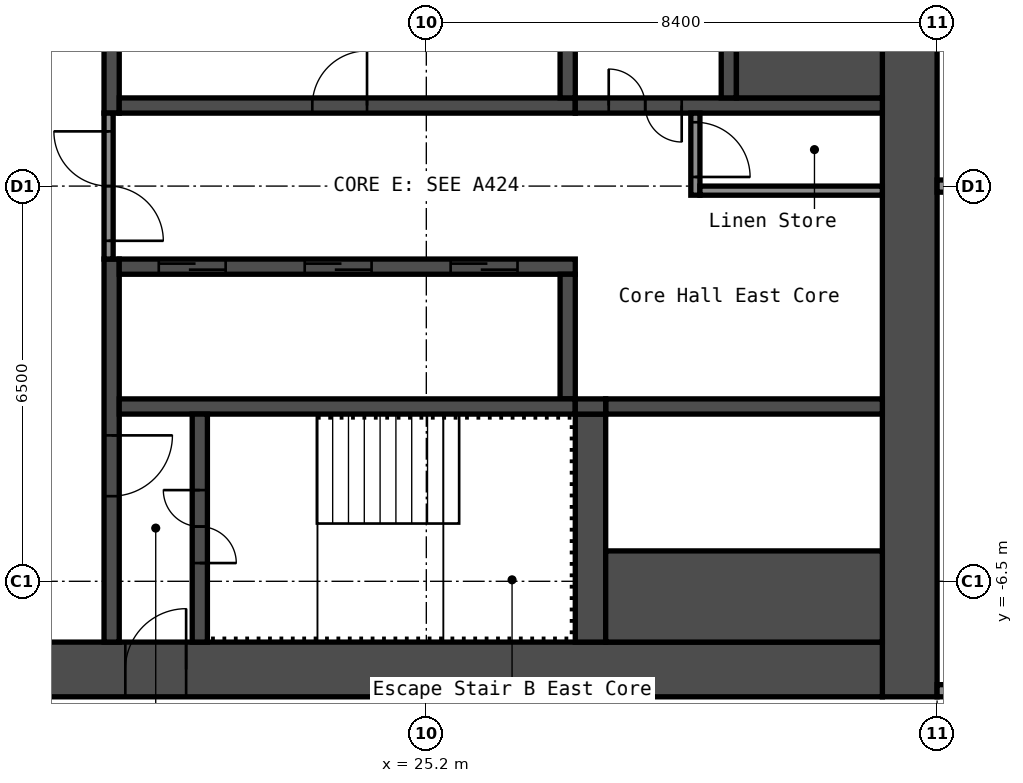
"""IFC4 building model, lengths in metres.
Left out: names, types, materials, properties, quantities, classifications, styles, units other than length and angle.
Written with IfcOpenShell. Run it as: python <this file> out.ifc"""

import sys

from ifc_helpers import new_model, si_unit, direction, frame, frame_2d, origin, place, context, subcontext, project, spatial, rectangle, extrude, element, fill, save


model = new_model("IFC4")
c1 = context("Model", 3, precision=1e-05, world=origin(), true_north=direction((0.0, 1.0)))
c2 = subcontext(c1, "Body", "Model", "MODEL_VIEW")
j1 = project(units=[si_unit("LENGTHUNIT", "METRE"), si_unit("PLANEANGLEUNIT", "RADIAN")], contexts=[c1])
p1 = place(None, origin())
s1 = spatial("IfcSite", under=j1, at=p1, CompositionType="ELEMENT")
p2 = place(p1, origin())
s2 = spatial("IfcBuilding", under=s1, at=p2, CompositionType="ELEMENT")
p3 = place(p2, frame((0.0, 0.0, 163.0)))
s3 = spatial("IfcBuildingStorey", under=s2, at=p3, CompositionType="ELEMENT", Elevation=163.0)
p4 = place(p3, frame((33.15, -8.4, 0.0), z_axis=(0.0, 0.0, 1.0), x_axis=(0.0, 1.0, 0.0)))
e1 = element("IfcWall", 1, at=p4, inside=s3, PredefinedType="SHEAR", context=c2, shape_type="SweptSolid", body=[
    extrude(rectangle(XDim=16.8, YDim=0.9, at=frame_2d((8.4, 0.0))), origin(), (0.0, 0.0, 1.0), 2.75),
])
p5 = place(p3, frame((17.7, -7.95, 0.0), z_axis=(0.0, 0.0, 1.0), x_axis=(1.0, 0.0, 0.0)))
e2 = element("IfcWall", 2, at=p5, inside=s3, PredefinedType="SHEAR", context=c2, shape_type="SweptSolid", body=[
    extrude(rectangle(XDim=15.0, YDim=0.9, at=frame_2d((7.5, 0.0))), origin(), (0.0, 0.0, 1.0), 2.75),
])
p6 = place(p5, frame((2.55, 0.0, 0.0)))
e3 = element("IfcOpeningElement", 3, at=p6, cuts=e2, PredefinedType="OPENING", context=c2, shape_type="SweptSolid", body=[
    extrude(rectangle(XDim=1.0, YDim=2.1, at=frame_2d((0.5, 1.05))), frame((0.0, 0.46, 0.0), z_axis=(0.0, -1.0, 0.0), x_axis=(1.0, 0.0, 0.0)), (0.0, 0.0, 1.0), 0.92),
])
p7 = place(p3, frame((20.025, 1.2, 0.0), z_axis=(0.0, 0.0, 1.0), x_axis=(0.0, 1.0, 0.0)))
e4 = element("IfcWall", 4, at=p7, inside=s3, PredefinedType="SHEAR", context=c2, shape_type="SweptSolid", body=[
    extrude(rectangle(XDim=6.3, YDim=0.25, at=frame_2d((3.15, 0.0))), origin(), (0.0, 0.0, 1.0), 2.75),
])
p8 = place(p3, frame((20.025, -7.5, 0.0), z_axis=(0.0, 0.0, 1.0), x_axis=(0.0, 1.0, 0.0)))
e5 = element("IfcWall", 5, at=p8, inside=s3, PredefinedType="SHEAR", context=c2, shape_type="SweptSolid", body=[
    extrude(rectangle(XDim=6.3, YDim=0.25, at=frame_2d((3.15, 0.0))), origin(), (0.0, 0.0, 1.0), 2.75),
])
p9 = place(p8, frame((2.4, 0.0, 0.0)))
e6 = element("IfcOpeningElement", 6, at=p9, cuts=e5, PredefinedType="OPENING", context=c2, shape_type="SweptSolid", body=[
    extrude(rectangle(XDim=1.0, YDim=2.1, at=frame_2d((0.5, 1.05))), frame((0.0, 0.135, 0.0), z_axis=(0.0, -1.0, 0.0), x_axis=(1.0, 0.0, 0.0)), (0.0, 0.0, 1.0), 0.27),
])
p10 = place(p3, frame((20.15, 1.325, 0.0), z_axis=(0.0, 0.0, 1.0), x_axis=(1.0, 0.0, 0.0)))
e7 = element("IfcWall", 7, at=p10, inside=s3, PredefinedType="SHEAR", context=c2, shape_type="SweptSolid", body=[
    extrude(rectangle(XDim=7.5, YDim=0.25, at=frame_2d((3.75, 0.0))), origin(), (0.0, 0.0, 1.0), 2.75),
])
p11 = place(p10, frame((3.175, 0.0, 0.0)))
e8 = element("IfcOpeningElement", 8, at=p11, cuts=e7, PredefinedType="OPENING", context=c2, shape_type="SweptSolid", body=[
    extrude(rectangle(XDim=0.9, YDim=2.1, at=frame_2d((0.45, 1.05))), frame((0.0, 0.135, 0.0), z_axis=(0.0, -1.0, 0.0), x_axis=(1.0, 0.0, 0.0)), (0.0, 0.0, 1.0), 0.27),
])
p12 = place(p3, frame((27.525, 1.45, 0.0), z_axis=(0.0, 0.0, 1.0), x_axis=(0.0, 1.0, 0.0)))
e9 = element("IfcWall", 9, at=p12, inside=s3, PredefinedType="SHEAR", context=c2, shape_type="SweptSolid", body=[
    extrude(rectangle(XDim=2.05, YDim=0.25, at=frame_2d((1.025, 0.0))), origin(), (0.0, 0.0, 1.0), 2.75),
])
p13 = place(p3, frame((27.65, 1.325, 0.0), z_axis=(0.0, 0.0, 1.0), x_axis=(1.0, 0.0, 0.0)))
e10 = element("IfcWall", 10, at=p13, inside=s3, PredefinedType="SHEAR", context=c2, shape_type="SweptSolid", body=[
    extrude(rectangle(XDim=5.05, YDim=0.25, at=frame_2d((2.525, 0.0))), origin(), (0.0, 0.0, 1.0), 2.75),
])
p14 = place(p13, frame((0.55, 0.0, 0.0)))
e11 = element("IfcOpeningElement", 11, at=p14, cuts=e10, PredefinedType="OPENING", context=c2, shape_type="SweptSolid", body=[
    extrude(rectangle(XDim=1.2, YDim=2.1, at=frame_2d((0.6, 1.05))), frame((0.0, 0.135, 0.0), z_axis=(0.0, -1.0, 0.0), x_axis=(1.0, 0.0, 0.0)), (0.0, 0.0, 1.0), 0.27),
])
p15 = place(p3, frame((30.175, 1.45, 0.0), z_axis=(0.0, 0.0, 1.0), x_axis=(0.0, 1.0, 0.0)))
e12 = element("IfcWall", 12, at=p15, inside=s3, PredefinedType="SHEAR", context=c2, shape_type="SweptSolid", body=[
    extrude(rectangle(XDim=6.05, YDim=0.25, at=frame_2d((3.025, 0.0))), origin(), (0.0, 0.0, 1.0), 2.75),
])
p16 = place(p15, frame((2.625, 0.0, 0.0)))
e13 = element("IfcOpeningElement", 13, at=p16, cuts=e12, PredefinedType="OPENING", context=c2, shape_type="SweptSolid", body=[
    extrude(rectangle(XDim=1.1, YDim=2.1, at=frame_2d((0.55, 1.05))), frame((0.0, 0.135, 0.0), z_axis=(0.0, -1.0, 0.0), x_axis=(1.0, 0.0, 0.0)), (0.0, 0.0, 1.0), 0.27),
])
p17 = place(p3, frame((30.3, 2.375, 0.0), z_axis=(0.0, 0.0, 1.0), x_axis=(1.0, 0.0, 0.0)))
e14 = element("IfcWall", 14, at=p17, inside=s3, PredefinedType="SHEAR", context=c2, shape_type="SweptSolid", body=[
    extrude(rectangle(XDim=2.4, YDim=1.85, at=frame_2d((1.2, 0.0))), origin(), (0.0, 0.0, 1.0), 2.75),
])
p18 = place(p3, frame((20.15, -1.325, 0.0), z_axis=(0.0, 0.0, 1.0), x_axis=(1.0, 0.0, 0.0)))
e15 = element("IfcWall", 15, at=p18, inside=s3, PredefinedType="SHEAR", context=c2, shape_type="SweptSolid", body=[
    extrude(rectangle(XDim=7.5, YDim=0.25, at=frame_2d((3.75, 0.0))), origin(), (0.0, 0.0, 1.0), 2.75),
])
p19 = place(p18, frame((0.65, 0.0, 0.0)))
e16 = element("IfcOpeningElement", 16, at=p19, cuts=e15, PredefinedType="OPENING", context=c2, shape_type="SweptSolid", body=[
    extrude(rectangle(XDim=1.1, YDim=2.1, at=frame_2d((0.55, 1.05))), frame((0.0, 0.135, 0.0), z_axis=(0.0, -1.0, 0.0), x_axis=(1.0, 0.0, 0.0)), (0.0, 0.0, 1.0), 0.27),
])
p20 = place(p18, frame((3.05, 0.0, 0.0)))
e17 = element("IfcOpeningElement", 17, at=p20, cuts=e15, PredefinedType="OPENING", context=c2, shape_type="SweptSolid", body=[
    extrude(rectangle(XDim=1.1, YDim=2.1, at=frame_2d((0.55, 1.05))), frame((0.0, 0.135, 0.0), z_axis=(0.0, -1.0, 0.0), x_axis=(1.0, 0.0, 0.0)), (0.0, 0.0, 1.0), 0.27),
])
p21 = place(p18, frame((5.45, 0.0, 0.0)))
e18 = element("IfcOpeningElement", 18, at=p21, cuts=e15, PredefinedType="OPENING", context=c2, shape_type="SweptSolid", body=[
    extrude(rectangle(XDim=1.1, YDim=2.1, at=frame_2d((0.55, 1.05))), frame((0.0, 0.135, 0.0), z_axis=(0.0, -1.0, 0.0), x_axis=(1.0, 0.0, 0.0)), (0.0, 0.0, 1.0), 0.27),
])
p22 = place(p3, frame((27.525, -3.5, 0.0), z_axis=(0.0, 0.0, 1.0), x_axis=(0.0, 1.0, 0.0)))
e19 = element("IfcWall", 19, at=p22, inside=s3, PredefinedType="SHEAR", context=c2, shape_type="SweptSolid", body=[
    extrude(rectangle(XDim=2.05, YDim=0.25, at=frame_2d((1.025, 0.0))), origin(), (0.0, 0.0, 1.0), 2.75),
])
p23 = place(p3, frame((20.15, -3.625, 0.0), z_axis=(0.0, 0.0, 1.0), x_axis=(1.0, 0.0, 0.0)))
e20 = element("IfcWall", 20, at=p23, inside=s3, PredefinedType="SHEAR", context=c2, shape_type="SweptSolid", body=[
    extrude(rectangle(XDim=7.5, YDim=0.25, at=frame_2d((3.75, 0.0))), origin(), (0.0, 0.0, 1.0), 2.75),
])
p24 = place(p3, frame((21.475, -7.5, 0.0), z_axis=(0.0, 0.0, 1.0), x_axis=(0.0, 1.0, 0.0)))
e21 = element("IfcWall", 21, at=p24, inside=s3, PredefinedType="SHEAR", context=c2, shape_type="SweptSolid", body=[
    extrude(rectangle(XDim=3.75, YDim=0.25, at=frame_2d((1.875, 0.0))), origin(), (0.0, 0.0, 1.0), 2.75),
])
p25 = place(p24, frame((1.3, 0.0, 0.0)))
e22 = element("IfcOpeningElement", 22, at=p25, cuts=e21, PredefinedType="OPENING", context=c2, shape_type="SweptSolid", body=[
    extrude(rectangle(XDim=1.2, YDim=2.1, at=frame_2d((0.6, 1.05))), frame((0.0, 0.135, 0.0), z_axis=(0.0, -1.0, 0.0), x_axis=(1.0, 0.0, 0.0)), (0.0, 0.0, 1.0), 0.27),
])
p26 = place(p3, frame((27.9, -7.5, 0.0), z_axis=(0.0, 0.0, 1.0), x_axis=(0.0, 1.0, 0.0)))
e23 = element("IfcWall", 23, at=p26, inside=s3, PredefinedType="SHEAR", context=c2, shape_type="SweptSolid", body=[
    extrude(rectangle(XDim=3.75, YDim=0.5, at=frame_2d((1.875, 0.0))), origin(), (0.0, 0.0, 1.0), 2.75),
])
p27 = place(p3, frame((28.15, -3.625, 0.0), z_axis=(0.0, 0.0, 1.0), x_axis=(1.0, 0.0, 0.0)))
e24 = element("IfcWall", 24, at=p27, inside=s3, PredefinedType="SHEAR", context=c2, shape_type="SweptSolid", body=[
    extrude(rectangle(XDim=4.55, YDim=0.25, at=frame_2d((2.275, 0.0))), origin(), (0.0, 0.0, 1.0), 2.75),
])
p28 = place(p3, frame((28.15, -6.75, 0.0), z_axis=(0.0, 0.0, 1.0), x_axis=(1.0, 0.0, 0.0)))
e25 = element("IfcWall", 25, at=p28, inside=s3, PredefinedType="SHEAR", context=c2, shape_type="SweptSolid", body=[
    extrude(rectangle(XDim=4.55, YDim=1.5, at=frame_2d((2.275, 0.0))), origin(), (0.0, 0.0, 1.0), 2.75),
])
p29 = place(p3, frame((27.65, -3.625, 0.0), z_axis=(0.0, 0.0, 1.0), x_axis=(1.0, 0.0, 0.0)))
e26 = element("IfcWall", 26, at=p29, inside=s3, PredefinedType="SHEAR", context=c2, shape_type="SweptSolid", body=[
    extrude(rectangle(XDim=0.5, YDim=0.25, at=frame_2d((0.25, 0.0))), origin(), (0.0, 0.0, 1.0), 2.75),
])
p30 = place(p3, frame((19.975, -1.2, 0.0), z_axis=(0.0, 0.0, 1.0), x_axis=(0.0, 1.0, 0.0)))
e27 = element("IfcWall", 27, at=p30, inside=s3, PredefinedType="PARTITIONING", context=c2, shape_type="SweptSolid", body=[
    extrude(rectangle(XDim=2.4, YDim=0.15, at=frame_2d((1.2, 0.0))), origin(), (0.0, 0.0, 1.0), 2.75),
])
p31 = place(p30, frame((0.3, 0.0, 0.0)))
e28 = element("IfcOpeningElement", 28, at=p31, cuts=e27, PredefinedType="OPENING", context=c2, shape_type="SweptSolid", body=[
    extrude(rectangle(XDim=1.8, YDim=2.1, at=frame_2d((0.9, 1.05))), frame((0.0, 0.085, 0.0), z_axis=(0.0, -1.0, 0.0), x_axis=(1.0, 0.0, 0.0)), (0.0, 0.0, 1.0), 0.17),
])
p32 = place(p3, frame((29.625, -0.15, 0.0), z_axis=(0.0, 0.0, 1.0), x_axis=(0.0, 1.0, 0.0)))
e29 = element("IfcWall", 29, at=p32, inside=s3, PredefinedType="PARTITIONING", context=c2, shape_type="SweptSolid", body=[
    extrude(rectangle(XDim=1.35, YDim=0.15, at=frame_2d((0.675, 0.0))), origin(), (0.0, 0.0, 1.0), 2.75),
])
p33 = place(p32, frame((0.3, 0.0, 0.0)))
e30 = element("IfcOpeningElement", 30, at=p33, cuts=e29, PredefinedType="OPENING", context=c2, shape_type="SweptSolid", body=[
    extrude(rectangle(XDim=0.9, YDim=2.1, at=frame_2d((0.45, 1.05))), frame((0.0, 0.085, 0.0), z_axis=(0.0, -1.0, 0.0), x_axis=(1.0, 0.0, 0.0)), (0.0, 0.0, 1.0), 0.17),
])
p34 = place(p3, frame((29.7, -0.075, 0.0), z_axis=(0.0, 0.0, 1.0), x_axis=(1.0, 0.0, 0.0)))
e31 = element("IfcWall", 31, at=p34, inside=s3, PredefinedType="PARTITIONING", context=c2, shape_type="SweptSolid", body=[
    extrude(rectangle(XDim=3.0, YDim=0.15, at=frame_2d((1.5, 0.0))), origin(), (0.0, 0.0, 1.0), 2.75),
])
p35 = place(p3, frame((33.6, -8.3, 0.0), z_axis=(0.0, 0.0, 1.0), x_axis=(1.0, 0.0, 0.0)))
e32 = element("IfcWall", 32, at=p35, inside=s3, PredefinedType="PARTITIONING", context=c2, shape_type="SweptSolid", body=[
    extrude(rectangle(XDim=6.6, YDim=0.2, at=frame_2d((3.3, 0.0))), origin(), (0.0, 0.0, 1.0), 2.75),
])
p36 = place(p35, frame((1.0, 0.0, 0.0)))
e33 = element("IfcOpeningElement", 33, at=p36, cuts=e32, PredefinedType="OPENING", context=c2, shape_type="SweptSolid", body=[
    extrude(rectangle(XDim=0.9, YDim=2.1, at=frame_2d((0.45, 1.05))), frame((0.0, 0.11, 0.0), z_axis=(0.0, -1.0, 0.0), x_axis=(1.0, 0.0, 0.0)), (0.0, 0.0, 1.0), 0.22),
])
p37 = place(p35, frame((4.3, 0.0, 0.0)))
e34 = element("IfcOpeningElement", 34, at=p37, cuts=e32, PredefinedType="OPENING", context=c2, shape_type="SweptSolid", body=[
    extrude(rectangle(XDim=0.9, YDim=2.1, at=frame_2d((0.45, 1.05))), frame((0.0, 0.11, 0.0), z_axis=(0.0, -1.0, 0.0), x_axis=(1.0, 0.0, 0.0)), (0.0, 0.0, 1.0), 0.22),
])
p38 = place(p3, frame((33.6, 0.0, 0.0), z_axis=(0.0, 0.0, 1.0), x_axis=(1.0, 0.0, 0.0)))
e35 = element("IfcWall", 35, at=p38, inside=s3, PredefinedType="PARTITIONING", context=c2, shape_type="SweptSolid", body=[
    extrude(rectangle(XDim=6.5, YDim=0.2, at=frame_2d((3.25, 0.0))), origin(), (0.0, 0.0, 1.0), 2.75),
])
p39 = place(p6, origin())
e36 = element("IfcDoor", 36, at=p39, inside=s3, OperationType="SINGLE_SWING_LEFT", PredefinedType="DOOR", context=c2, shape_type="SweptSolid", body=[
    extrude(rectangle(XDim=1.0, YDim=2.1, at=frame_2d((0.5, 1.05))), frame((0.0, 0.025, 0.0), z_axis=(0.0, -1.0, 0.0), x_axis=(1.0, 0.0, 0.0)), (0.0, 0.0, 1.0), 0.05),
])
fill(e3, e36)
p40 = place(p25, origin())
e37 = element("IfcDoor", 37, at=p40, inside=s3, OperationType="DOUBLE_DOOR_SINGLE_SWING", PredefinedType="DOOR", context=c2, shape_type="SweptSolid", body=[
    extrude(rectangle(XDim=1.2, YDim=2.1, at=frame_2d((0.6, 1.05))), frame((0.0, 0.025, 0.0), z_axis=(0.0, -1.0, 0.0), x_axis=(1.0, 0.0, 0.0)), (0.0, 0.0, 1.0), 0.05),
])
fill(e22, e37)
p41 = place(p9, origin())
e38 = element("IfcDoor", 38, at=p41, inside=s3, OperationType="SINGLE_SWING_RIGHT", PredefinedType="DOOR", context=c2, shape_type="SweptSolid", body=[
    extrude(rectangle(XDim=1.0, YDim=2.1, at=frame_2d((0.5, 1.05))), frame((0.0, 0.025, 0.0), z_axis=(0.0, -1.0, 0.0), x_axis=(1.0, 0.0, 0.0)), (0.0, 0.0, 1.0), 0.05),
])
fill(e6, e38)
p42 = place(p14, origin())
e39 = element("IfcDoor", 39, at=p42, inside=s3, OperationType="DOUBLE_DOOR_SINGLE_SWING", PredefinedType="DOOR", context=c2, shape_type="SweptSolid", body=[
    extrude(rectangle(XDim=1.2, YDim=2.1, at=frame_2d((0.6, 1.05))), frame((0.0, 0.025, 0.0), z_axis=(0.0, -1.0, 0.0), x_axis=(1.0, 0.0, 0.0)), (0.0, 0.0, 1.0), 0.05),
])
fill(e11, e39)
p43 = place(p31, origin())
e40 = element("IfcDoor", 40, at=p43, inside=s3, OperationType="DOUBLE_DOOR_SINGLE_SWING", PredefinedType="DOOR", context=c2, shape_type="SweptSolid", body=[
    extrude(rectangle(XDim=1.8, YDim=2.1, at=frame_2d((0.9, 1.05))), frame((0.0, 0.025, 0.0), z_axis=(0.0, -1.0, 0.0), x_axis=(1.0, 0.0, 0.0)), (0.0, 0.0, 1.0), 0.05),
])
fill(e28, e40)
p44 = place(p33, origin())
e41 = element("IfcDoor", 41, at=p44, inside=s3, OperationType="SINGLE_SWING_LEFT", PredefinedType="DOOR", context=c2, shape_type="SweptSolid", body=[
    extrude(rectangle(XDim=0.9, YDim=2.1, at=frame_2d((0.45, 1.05))), frame((0.0, 0.025, 0.0), z_axis=(0.0, -1.0, 0.0), x_axis=(1.0, 0.0, 0.0)), (0.0, 0.0, 1.0), 0.05),
])
fill(e30, e41)
p45 = place(p11, origin())
e42 = element("IfcDoor", 42, at=p45, inside=s3, OperationType="SINGLE_SWING_LEFT", PredefinedType="DOOR", context=c2, shape_type="SweptSolid", body=[
    extrude(rectangle(XDim=0.9, YDim=2.1, at=frame_2d((0.45, 1.05))), frame((0.0, 0.025, 0.0), z_axis=(0.0, -1.0, 0.0), x_axis=(1.0, 0.0, 0.0)), (0.0, 0.0, 1.0), 0.05),
])
fill(e8, e42)
p46 = place(p19, origin())
e43 = element("IfcDoor", 43, at=p46, inside=s3, OperationType="DOUBLE_DOOR_SLIDING", PredefinedType="DOOR", context=c2, shape_type="SweptSolid", body=[
    extrude(rectangle(XDim=1.1, YDim=2.1, at=frame_2d((0.55, 1.05))), frame((0.0, 0.025, 0.0), z_axis=(0.0, -1.0, 0.0), x_axis=(1.0, 0.0, 0.0)), (0.0, 0.0, 1.0), 0.05),
])
fill(e16, e43)
p47 = place(p20, origin())
e44 = element("IfcDoor", 44, at=p47, inside=s3, OperationType="DOUBLE_DOOR_SLIDING", PredefinedType="DOOR", context=c2, shape_type="SweptSolid", body=[
    extrude(rectangle(XDim=1.1, YDim=2.1, at=frame_2d((0.55, 1.05))), frame((0.0, 0.025, 0.0), z_axis=(0.0, -1.0, 0.0), x_axis=(1.0, 0.0, 0.0)), (0.0, 0.0, 1.0), 0.05),
])
fill(e17, e44)
p48 = place(p21, origin())
e45 = element("IfcDoor", 45, at=p48, inside=s3, OperationType="DOUBLE_DOOR_SLIDING", PredefinedType="DOOR", context=c2, shape_type="SweptSolid", body=[
    extrude(rectangle(XDim=1.1, YDim=2.1, at=frame_2d((0.55, 1.05))), frame((0.0, 0.025, 0.0), z_axis=(0.0, -1.0, 0.0), x_axis=(1.0, 0.0, 0.0)), (0.0, 0.0, 1.0), 0.05),
])
fill(e18, e45)
save(model, sys.argv[1])
